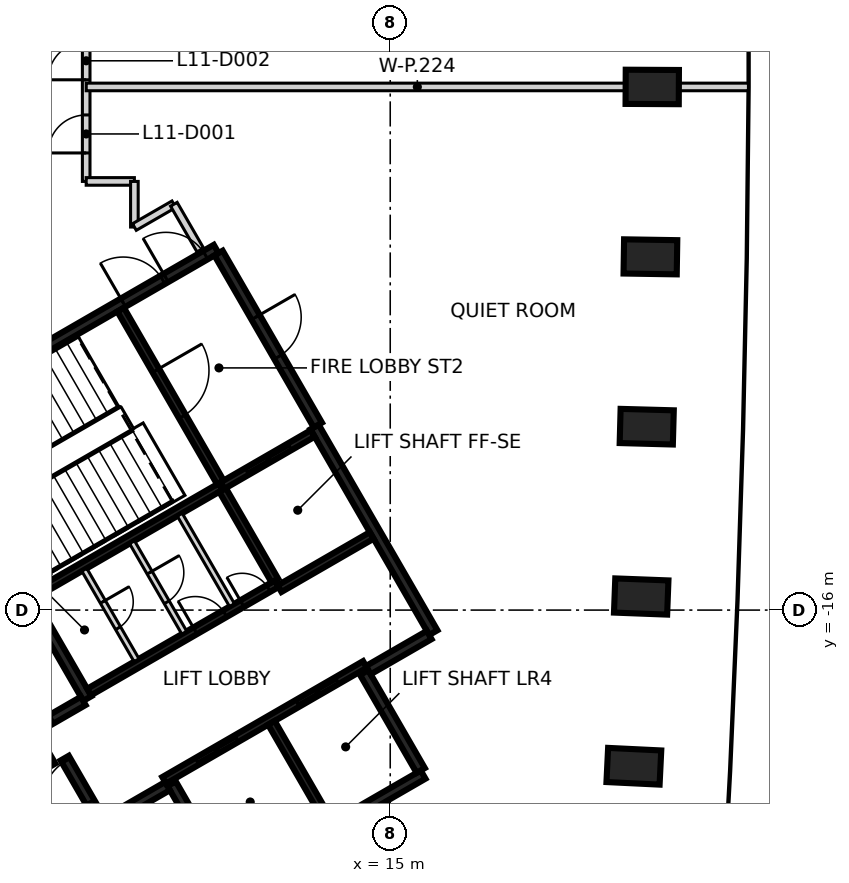
"""IFC4 building model, lengths in metres.
Left out: names, types, materials, properties, quantities, classifications, styles, units other than length and angle.
Written with IfcOpenShell. Run it as: python <this file> out.ifc"""

import sys

from ifc_helpers import new_model, si_unit, direction, frame, frame_2d, origin, origin_2d, place, context, subcontext, project, spatial, rectangle, extrude, element, fill, save


model = new_model("IFC4")
c1 = context("Model", 3, precision=1e-05, world=origin(), true_north=direction((0.0, 1.0)))
c2 = subcontext(c1, "Body", "Model", "MODEL_VIEW")
j1 = project(units=[si_unit("LENGTHUNIT", "METRE"), si_unit("PLANEANGLEUNIT", "RADIAN")], contexts=[c1])
p1 = place(None, origin())
s1 = spatial("IfcSite", under=j1, at=p1, CompositionType="ELEMENT")
p2 = place(p1, origin())
s2 = spatial("IfcBuilding", under=s1, at=p2, CompositionType="ELEMENT")
p3 = place(p2, frame((0.0, 0.0, 53.0)))
s3 = spatial("IfcBuildingStorey", under=s2, at=p3, CompositionType="ELEMENT", Elevation=53.0)
for number, where, z_axis, x_axis in (
    (1, (21.41, -20.109, -0.475), (0.0, 0.0, 1.0), (-0.999, 0.048, 0.0)),
    (2, (21.604, -15.643, -0.475), (0.0, 0.0, 1.0), (-0.999, 0.038, 0.0)),
    (3, (21.749, -11.174, -0.475), (0.0, 0.0, 1.0), (-1.0, 0.027, 0.0)),
    (4, (21.846, -6.706, -0.475), (0.0, 0.0, 1.0), (-1.0, 0.016, 0.0)),
    (5, (21.894, -2.235, -0.475), (0.0, 0.0, 1.0), (-1.0, 0.005, 0.0)),
):
    element("IfcColumn", number, at=place(p3, frame(where, z_axis=z_axis, x_axis=x_axis)), inside=s3, PredefinedType="COLUMN", context=c2, shape_type="SweptSolid", body=[
        extrude(rectangle(XDim=1.4, YDim=0.9, at=origin_2d()), origin(), (0.0, 0.0, 1.0), 3.6),
    ])
p4 = place(p3, frame((0.417, -12.273, 0.0), z_axis=(0.0, 0.0, 1.0), x_axis=(0.866021906294, 0.500006057782, 0.0)))
e6 = element("IfcWall", 6, at=p4, inside=s3, PredefinedType="SHEAR", context=c2, shape_type="SweptSolid", body=[
    extrude(rectangle(XDim=11.55, YDim=0.25, at=frame_2d((5.775, 0.0))), origin(), (0.0, 0.0, 1.0), 3.125),
])
p5 = place(p4, frame((10.025, 0.0, 0.0)))
e7 = element("IfcOpeningElement", 7, at=p5, cuts=e6, PredefinedType="OPENING", context=c2, shape_type="SweptSolid", body=[
    extrude(rectangle(XDim=1.2, YDim=2.1, at=frame_2d((0.6, 1.05))), frame((0.0, 0.135, 0.0), z_axis=(0.0, -1.0, 0.0), x_axis=(1.0, 0.0, 0.0)), (0.0, 0.0, 1.0), 0.27),
])
p6 = place(p4, frame((8.725, 0.0, 0.0)))
e8 = element("IfcOpeningElement", 8, at=p6, cuts=e6, PredefinedType="OPENING", context=c2, shape_type="SweptSolid", body=[
    extrude(rectangle(XDim=1.2, YDim=2.1, at=frame_2d((0.6, 1.05))), frame((0.0, 0.135, 0.0), z_axis=(0.0, -1.0, 0.0), x_axis=(1.0, 0.0, 0.0)), (0.0, 0.0, 1.0), 0.27),
])
p7 = place(p3, frame((13.008, -11.181, 0.0), z_axis=(0.0, 0.0, 1.0), x_axis=(0.500004234368, -0.866022959057, 0.0)))
e9 = element("IfcWall", 9, at=p7, inside=s3, PredefinedType="SHEAR", context=c2, shape_type="SweptSolid", body=[
    extrude(rectangle(XDim=6.25, YDim=0.25, at=frame_2d((3.125, 0.0))), origin(), (0.0, 0.0, 1.0), 3.125),
])
p8 = place(p3, frame((15.865, -20.328, 0.0), z_axis=(0.0, 0.0, 1.0), x_axis=(-0.86602852612, -0.499994591916, 0.0)))
e10 = element("IfcWall", 10, at=p8, inside=s3, PredefinedType="SHEAR", context=c2, shape_type="SweptSolid", body=[
    extrude(rectangle(XDim=5.85, YDim=0.25, at=frame_2d((2.925, 0.0))), origin(), (0.0, 0.0, 1.0), 3.125),
])
p9 = place(p3, frame((10.483, -6.606, 0.0), z_axis=(0.0, 0.0, 1.0), x_axis=(0.49999885962, -0.866026062182, 0.0)))
e11 = element("IfcWall", 11, at=p9, inside=s3, PredefinedType="SHEAR", context=c2, shape_type="SweptSolid", body=[
    extrude(rectangle(XDim=5.225, YDim=0.25, at=frame_2d((2.612, 0.0))), origin(), (0.0, 0.0, 1.0), 3.125),
])
p10 = place(p9, frame((1.95, 0.0, 0.0)))
e12 = element("IfcOpeningElement", 12, at=p10, cuts=e11, PredefinedType="OPENING", context=c2, shape_type="SweptSolid", body=[
    extrude(rectangle(XDim=1.2, YDim=2.1, at=frame_2d((0.6, 1.05))), frame((0.0, 0.135, 0.0), z_axis=(0.0, -1.0, 0.0), x_axis=(1.0, 0.0, 0.0)), (0.0, 0.0, 1.0), 0.27),
])
p11 = place(p3, frame((7.031, -18.327, 0.0), z_axis=(0.0, 0.0, 1.0), x_axis=(-0.499971222258, 0.866042017984, 0.0)))
e13 = element("IfcWall", 13, at=p11, inside=s3, PredefinedType="SHEAR", context=c2, shape_type="SweptSolid", body=[
    extrude(rectangle(XDim=3.2, YDim=0.25, at=frame_2d((1.6, 0.0))), origin(), (0.0, 0.0, 1.0), 3.125),
])
for number, where, z_axis, x_axis in (
    (14, (14.315, -17.644, 0.0), (0.0, 0.0, 1.0), (0.5, -0.866, 0.0)),
    (15, (10.736, -23.145, 0.0), (0.0, 0.0, 1.0), (-0.5, 0.866, 0.0)),
):
    element("IfcWall", number, at=place(p3, frame(where, z_axis=z_axis, x_axis=x_axis)), inside=s3, PredefinedType="SHEAR", context=c2, shape_type="SweptSolid", body=[
        extrude(rectangle(XDim=2.974, YDim=0.25, at=frame_2d((1.487, 0.0))), origin(), (0.0, 0.0, 1.0), 3.125),
    ])
p12 = place(p3, frame((9.14, -20.631, 0.0), z_axis=(0.0, 0.0, 1.0), x_axis=(-0.866043531843, -0.499968599967, 0.0)))
e16 = element("IfcWall", 16, at=p12, inside=s3, PredefinedType="SHEAR", context=c2, shape_type="SweptSolid", body=[
    extrude(rectangle(XDim=1.975, YDim=0.25, at=frame_2d((0.987, 0.0))), origin(), (0.0, 0.0, 1.0), 3.125),
])
p13 = place(p3, frame((16.025, -16.656, 0.0), z_axis=(0.0, 0.0, 1.0), x_axis=(-0.866016279763, -0.500015802937, 0.0)))
e17 = element("IfcWall", 17, at=p13, inside=s3, PredefinedType="SHEAR", context=c2, shape_type="SweptSolid", body=[
    extrude(rectangle(XDim=1.849, YDim=0.25, at=frame_2d((0.925, 0.0))), origin(), (0.0, 0.0, 1.0), 3.125),
])
p14 = place(p3, frame((7.367, -21.51, 0.0), z_axis=(0.0, 0.0, 1.0), x_axis=(-0.499983108224, 0.866035156036, 0.0)))
e18 = element("IfcWall", 18, at=p14, inside=s3, PredefinedType="SHEAR", context=c2, shape_type="SweptSolid", body=[
    extrude(rectangle(XDim=1.865, YDim=0.25, at=frame_2d((0.932, 0.0))), origin(), (0.0, 0.0, 1.0), 3.125),
])
p15 = place(p14, frame((0.535, 0.0, 0.0)))
e19 = element("IfcOpeningElement", 19, at=p15, cuts=e18, PredefinedType="OPENING", context=c2, shape_type="SweptSolid", body=[
    extrude(rectangle(XDim=1.25, YDim=2.1, at=frame_2d((0.625, 1.05))), frame((0.0, 0.135, 0.0), z_axis=(0.0, -1.0, 0.0), x_axis=(1.0, 0.0, 0.0)), (0.0, 0.0, 1.0), 0.27),
])
p16 = place(p3, frame((6.065, -18.885, 0.0), z_axis=(0.0, 0.0, 1.0), x_axis=(0.866017078145, 0.500014420154, 0.0)))
e20 = element("IfcWall", 20, at=p16, inside=s3, PredefinedType="SHEAR", context=c2, shape_type="SweptSolid", body=[
    extrude(rectangle(XDim=0.989, YDim=0.25, at=frame_2d((0.495, 0.0))), origin(), (0.0, 0.0, 1.0), 3.125),
])
p17 = place(p3, frame((6.08, -20.1, 0.0), z_axis=(0.0, 0.0, 1.0), x_axis=(-0.500051773299, 0.865995510393, 0.0)))
e21 = element("IfcWall", 21, at=p17, inside=s3, PredefinedType="SHEAR", context=c2, shape_type="SweptSolid", body=[
    extrude(rectangle(XDim=0.685, YDim=0.25, at=frame_2d((0.342, 0.0))), origin(), (0.0, 0.0, 1.0), 3.125),
])
p18 = place(p3, frame((9.052, -20.48, 0.0), z_axis=(0.0, 0.0, 1.0), x_axis=(0.866030299012, 0.499991521122, 0.0)))
e22 = element("IfcWall", 22, at=p18, inside=s3, PredefinedType="SHEAR", context=c2, shape_type="SweptSolid", body=[
    extrude(rectangle(XDim=6.1, YDim=0.2, at=frame_2d((3.05, 0.0))), origin(), (0.0, 0.0, 1.0), 3.125),
])
p19 = place(p18, frame((1.0, 0.0, 0.0)))
e23 = element("IfcOpeningElement", 23, at=p19, cuts=e22, PredefinedType="OPENING", context=c2, shape_type="SweptSolid", body=[
    extrude(rectangle(XDim=1.2, YDim=2.1, at=frame_2d((0.6, 1.05))), frame((0.0, 0.11, 0.0), z_axis=(0.0, -1.0, 0.0), x_axis=(1.0, 0.0, 0.0)), (0.0, 0.0, 1.0), 0.22),
])
p20 = place(p18, frame((4.05, 0.0, 0.0)))
e24 = element("IfcOpeningElement", 24, at=p20, cuts=e22, PredefinedType="OPENING", context=c2, shape_type="SweptSolid", body=[
    extrude(rectangle(XDim=1.2, YDim=2.1, at=frame_2d((0.6, 1.05))), frame((0.0, 0.11, 0.0), z_axis=(0.0, -1.0, 0.0), x_axis=(1.0, 0.0, 0.0)), (0.0, 0.0, 1.0), 0.22),
])
p21 = place(p3, frame((10.538, -12.752, 0.0), z_axis=(0.0, 0.0, 1.0), x_axis=(-0.866038630372, -0.499977090179, 0.0)))
e25 = element("IfcWall", 25, at=p21, inside=s3, PredefinedType="SHEAR", context=c2, shape_type="SweptSolid", body=[
    extrude(rectangle(XDim=5.699, YDim=0.2, at=frame_2d((2.85, 0.0))), origin(), (0.0, 0.0, 1.0), 3.125),
])
p22 = place(p3, frame((7.077, -18.156, 0.0), z_axis=(0.0, 0.0, 1.0), x_axis=(0.866038630372, 0.499977090179, 0.0)))
e26 = element("IfcWall", 26, at=p22, inside=s3, PredefinedType="SHEAR", context=c2, shape_type="SweptSolid", body=[
    extrude(rectangle(XDim=5.699, YDim=0.2, at=frame_2d((2.85, 0.0))), origin(), (0.0, 0.0, 1.0), 3.125),
])
p23 = place(p22, frame((3.224, 0.0, 0.0)))
e27 = element("IfcOpeningElement", 27, at=p23, cuts=e26, PredefinedType="OPENING", context=c2, shape_type="SweptSolid", body=[
    extrude(rectangle(XDim=0.9, YDim=2.1, at=frame_2d((0.45, 1.05))), frame((0.0, 0.11, 0.0), z_axis=(0.0, -1.0, 0.0), x_axis=(1.0, 0.0, 0.0)), (0.0, 0.0, 1.0), 0.22),
])
p24 = place(p22, frame((4.649, 0.0, 0.0)))
e28 = element("IfcOpeningElement", 28, at=p24, cuts=e26, PredefinedType="OPENING", context=c2, shape_type="SweptSolid", body=[
    extrude(rectangle(XDim=0.8, YDim=2.1, at=frame_2d((0.4, 1.05))), frame((0.0, 0.11, 0.0), z_axis=(0.0, -1.0, 0.0), x_axis=(1.0, 0.0, 0.0)), (0.0, 0.0, 1.0), 0.22),
])
p25 = place(p3, frame((7.906, -8.094, 0.0), z_axis=(0.0, 0.0, 1.0), x_axis=(0.500024287448, -0.866011380966, 0.0)))
e29 = element("IfcWall", 29, at=p25, inside=s3, PredefinedType="SHEAR", context=c2, shape_type="SweptSolid", body=[
    extrude(rectangle(XDim=5.251, YDim=0.2, at=frame_2d((2.625, 0.0))), origin(), (0.0, 0.0, 1.0), 3.125),
])
p26 = place(p25, frame((1.849, 0.0, 0.0)))
e30 = element("IfcOpeningElement", 30, at=p26, cuts=e29, PredefinedType="OPENING", context=c2, shape_type="SweptSolid", body=[
    extrude(rectangle(XDim=1.4, YDim=2.1, at=frame_2d((0.7, 1.05))), frame((0.0, 0.11, 0.0), z_axis=(0.0, -1.0, 0.0), x_axis=(1.0, 0.0, 0.0)), (0.0, 0.0, 1.0), 0.22),
])
p27 = place(p3, frame((11.875, -18.967, 0.0), z_axis=(0.0, 0.0, 1.0), x_axis=(0.49998131003, -0.866036194175, 0.0)))
e31 = element("IfcWall", 31, at=p27, inside=s3, PredefinedType="SHEAR", context=c2, shape_type="SweptSolid", body=[
    extrude(rectangle(XDim=3.048, YDim=0.2, at=frame_2d((1.524, 0.0))), origin(), (0.0, 0.0, 1.0), 3.125),
])
p28 = place(p3, frame((11.963, -15.22, 0.0), z_axis=(0.0, 0.0, 1.0), x_axis=(-0.500034990121, 0.866005201286, 0.0)))
e32 = element("IfcWall", 32, at=p28, inside=s3, PredefinedType="SHEAR", context=c2, shape_type="SweptSolid", body=[
    extrude(rectangle(XDim=2.75, YDim=0.2, at=frame_2d((1.375, 0.0))), origin(), (0.0, 0.0, 1.0), 3.125),
])
p29 = place(p3, frame((10.587, -12.723, 0.0), z_axis=(0.0, 0.0, 1.0), x_axis=(0.866037306777, 0.499979382845, 0.0)))
e33 = element("IfcWall", 33, at=p29, inside=s3, PredefinedType="SHEAR", context=c2, shape_type="SweptSolid", body=[
    extrude(rectangle(XDim=2.742, YDim=0.2, at=frame_2d((1.371, 0.0))), origin(), (0.0, 0.0, 1.0), 3.125),
])
p30 = place(p29, frame((0.743, 0.0, 0.0)))
e34 = element("IfcOpeningElement", 34, at=p30, cuts=e33, PredefinedType="OPENING", context=c2, shape_type="SweptSolid", body=[
    extrude(rectangle(XDim=1.3, YDim=2.1, at=frame_2d((0.65, 1.05))), frame((0.0, 0.11, 0.0), z_axis=(0.0, -1.0, 0.0), x_axis=(1.0, 0.0, 0.0)), (0.0, 0.0, 1.0), 0.22),
])
p31 = place(p3, frame((14.512, -14.037, 0.0), z_axis=(0.0, 0.0, 1.0), x_axis=(-0.866044696403, -0.499966582715, 0.0)))
e35 = element("IfcWall", 35, at=p31, inside=s3, PredefinedType="SHEAR", context=c2, shape_type="SweptSolid", body=[
    extrude(rectangle(XDim=2.799, YDim=0.2, at=frame_2d((1.399, 0.0))), origin(), (0.0, 0.0, 1.0), 3.125),
])
p32 = place(p3, frame((8.207, -14.214, 0.0), z_axis=(0.0, 0.0, 1.0), x_axis=(0.50002746344, -0.86600954718, 0.0)))
e36 = element("IfcWall", 36, at=p32, inside=s3, PredefinedType="PARTITIONING", context=c2, shape_type="SweptSolid", body=[
    extrude(rectangle(XDim=2.748, YDim=0.15, at=frame_2d((1.374, 0.0))), origin(), (0.0, 0.0, 1.0), 3.125),
])
p33 = place(p32, frame((0.924, 0.0, 0.0)))
e37 = element("IfcOpeningElement", 37, at=p33, cuts=e36, PredefinedType="OPENING", context=c2, shape_type="SweptSolid", body=[
    extrude(rectangle(XDim=0.9, YDim=2.1, at=frame_2d((0.45, 1.05))), frame((0.0, 0.085, 0.0), z_axis=(0.0, -1.0, 0.0), x_axis=(1.0, 0.0, 0.0)), (0.0, 0.0, 1.0), 0.17),
])
p34 = place(p3, frame((9.462, -13.489, 0.0), z_axis=(0.0, 0.0, 1.0), x_axis=(0.499988999718, -0.866031754707, 0.0)))
e38 = element("IfcWall", 38, at=p34, inside=s3, PredefinedType="PARTITIONING", context=c2, shape_type="SweptSolid", body=[
    extrude(rectangle(XDim=2.749, YDim=0.15, at=frame_2d((1.374, 0.0))), origin(), (0.0, 0.0, 1.0), 3.125),
])
p35 = place(p3, frame((6.951, -14.939, 0.0), z_axis=(0.0, 0.0, 1.0), x_axis=(0.499988999718, -0.866031754707, 0.0)))
e39 = element("IfcWall", 39, at=p35, inside=s3, PredefinedType="PARTITIONING", context=c2, shape_type="SweptSolid", body=[
    extrude(rectangle(XDim=2.749, YDim=0.15, at=frame_2d((1.374, 0.0))), origin(), (0.0, 0.0, 1.0), 3.125),
])
p36 = place(p35, frame((0.974, 0.0, 0.0)))
e40 = element("IfcOpeningElement", 40, at=p36, cuts=e39, PredefinedType="OPENING", context=c2, shape_type="SweptSolid", body=[
    extrude(rectangle(XDim=0.8, YDim=2.1, at=frame_2d((0.4, 1.05))), frame((0.0, 0.085, 0.0), z_axis=(0.0, -1.0, 0.0), x_axis=(1.0, 0.0, 0.0)), (0.0, 0.0, 1.0), 0.17),
])
p37 = place(p3, frame((7.0, -4.721, 0.0), z_axis=(0.0, 0.0, 1.0), x_axis=(0.0, 1.0, 0.0)))
e41 = element("IfcWall", 41, at=p37, inside=s3, PredefinedType="PARTITIONING", context=c2, shape_type="SweptSolid", body=[
    extrude(rectangle(XDim=8.799, YDim=0.2, at=frame_2d((4.399, 0.0))), origin(), (0.0, 0.0, 1.0), 3.125),
])
p38 = place(p37, frame((0.749, 0.0, 0.0)))
e42 = element("IfcOpeningElement", 42, at=p38, cuts=e41, PredefinedType="OPENING", context=c2, shape_type="SweptSolid", body=[
    extrude(rectangle(XDim=1.0, YDim=2.1, at=frame_2d((0.5, 1.05))), frame((0.0, 0.11, 0.0), z_axis=(0.0, -1.0, 0.0), x_axis=(1.0, 0.0, 0.0)), (0.0, 0.0, 1.0), 0.22),
])
p39 = place(p37, frame((2.674, 0.0, 0.0)))
e43 = element("IfcOpeningElement", 43, at=p39, cuts=e41, PredefinedType="OPENING", context=c2, shape_type="SweptSolid", body=[
    extrude(rectangle(XDim=1.0, YDim=2.1, at=frame_2d((0.5, 1.05))), frame((0.0, 0.11, 0.0), z_axis=(0.0, -1.0, 0.0), x_axis=(1.0, 0.0, 0.0)), (0.0, 0.0, 1.0), 0.22),
])
p40 = place(p3, frame((7.0, -4.721, 0.0), z_axis=(0.0, 0.0, 1.0), x_axis=(1.0, 0.0, 0.0)))
e44 = element("IfcWall", 44, at=p40, inside=s3, PredefinedType="PARTITIONING", context=c2, shape_type="SweptSolid", body=[
    extrude(rectangle(XDim=1.268, YDim=0.2, at=frame_2d((0.634, 0.0))), origin(), (0.0, 0.0, 1.0), 3.125),
])
p41 = place(p3, frame((8.268, -5.921, 0.0), z_axis=(0.0, 0.0, 1.0), x_axis=(0.0, 1.0, 0.0)))
e45 = element("IfcWall", 45, at=p41, inside=s3, PredefinedType="PARTITIONING", context=c2, shape_type="SweptSolid", body=[
    extrude(rectangle(XDim=1.2, YDim=0.2, at=frame_2d((0.6, 0.0))), origin(), (0.0, 0.0, 1.0), 3.125),
])
p42 = place(p3, frame((8.268, -5.921, 0.0), z_axis=(0.0, 0.0, 1.0), x_axis=(0.866344856625, 0.499446282797, 0.0)))
e46 = element("IfcWall", 46, at=p42, inside=s3, PredefinedType="PARTITIONING", context=c2, shape_type="SweptSolid", body=[
    extrude(rectangle(XDim=1.199, YDim=0.2, at=frame_2d((0.6, 0.0))), origin(), (0.0, 0.0, 1.0), 3.125),
])
p43 = place(p3, frame((9.307, -5.322, 0.0), z_axis=(0.0, 0.0, 1.0), x_axis=(0.500295157811, -0.865854927266, 0.0)))
e47 = element("IfcWall", 47, at=p43, inside=s3, PredefinedType="PARTITIONING", context=c2, shape_type="SweptSolid", body=[
    extrude(rectangle(XDim=1.39, YDim=0.2, at=frame_2d((0.695, 0.0))), origin(), (0.0, 0.0, 1.0), 3.125),
])
p44 = place(p3, frame((7.001, -2.235, 0.0), z_axis=(0.0, 0.0, 1.0), x_axis=(1.0, 0.0, 0.0)))
e48 = element("IfcWall", 48, at=p44, inside=s3, PredefinedType="PARTITIONING", context=c2, shape_type="SweptSolid", body=[
    extrude(rectangle(XDim=17.424, YDim=0.2, at=frame_2d((8.712, 0.0))), origin(), (0.0, 0.0, 1.0), 3.125),
])
p45 = place(p30, origin())
e49 = element("IfcDoor", 49, at=p45, inside=s3, OperationType="SLIDING_TO_RIGHT", PredefinedType="DOOR", context=c2, shape_type="SweptSolid", body=[
    extrude(rectangle(XDim=1.3, YDim=2.1, at=frame_2d((0.65, 1.05))), frame((0.0, 0.025, 0.0), z_axis=(0.0, -1.0, 0.0), x_axis=(1.0, 0.0, 0.0)), (0.0, 0.0, 1.0), 0.05),
])
fill(e34, e49)
p46 = place(p19, origin())
e50 = element("IfcDoor", 50, at=p46, inside=s3, OperationType="DOUBLE_DOOR_SLIDING", PredefinedType="DOOR", context=c2, shape_type="SweptSolid", body=[
    extrude(rectangle(XDim=1.2, YDim=2.1, at=frame_2d((0.6, 1.05))), frame((0.0, 0.025, 0.0), z_axis=(0.0, -1.0, 0.0), x_axis=(1.0, 0.0, 0.0)), (0.0, 0.0, 1.0), 0.05),
])
fill(e23, e50)
p47 = place(p20, origin())
e51 = element("IfcDoor", 51, at=p47, inside=s3, OperationType="DOUBLE_DOOR_SLIDING", PredefinedType="DOOR", context=c2, shape_type="SweptSolid", body=[
    extrude(rectangle(XDim=1.2, YDim=2.1, at=frame_2d((0.6, 1.05))), frame((0.0, 0.025, 0.0), z_axis=(0.0, -1.0, 0.0), x_axis=(1.0, 0.0, 0.0)), (0.0, 0.0, 1.0), 0.05),
])
fill(e24, e51)
p48 = place(p15, origin())
e52 = element("IfcDoor", 52, at=p48, inside=s3, OperationType="SINGLE_SWING_LEFT", PredefinedType="DOOR", context=c2, shape_type="SweptSolid", body=[
    extrude(rectangle(XDim=1.25, YDim=2.1, at=frame_2d((0.625, 1.05))), frame((0.0, 0.025, 0.0), z_axis=(0.0, -1.0, 0.0), x_axis=(1.0, 0.0, 0.0)), (0.0, 0.0, 1.0), 0.05),
])
fill(e19, e52)
p49 = place(p5, origin())
e53 = element("IfcDoor", 53, at=p49, inside=s3, OperationType="SINGLE_SWING_LEFT", PredefinedType="DOOR", context=c2, shape_type="SweptSolid", body=[
    extrude(rectangle(XDim=1.2, YDim=2.1, at=frame_2d((0.6, 1.05))), frame((0.0, 0.025, 0.0), z_axis=(0.0, -1.0, 0.0), x_axis=(1.0, 0.0, 0.0)), (0.0, 0.0, 1.0), 0.05),
])
fill(e7, e53)
p50 = place(p6, origin())
e54 = element("IfcDoor", 54, at=p50, inside=s3, OperationType="SINGLE_SWING_RIGHT", PredefinedType="DOOR", context=c2, shape_type="SweptSolid", body=[
    extrude(rectangle(XDim=1.2, YDim=2.1, at=frame_2d((0.6, 1.05))), frame((0.0, 0.025, 0.0), z_axis=(0.0, -1.0, 0.0), x_axis=(1.0, 0.0, 0.0)), (0.0, 0.0, 1.0), 0.05),
])
fill(e8, e54)
p51 = place(p26, origin())
e55 = element("IfcDoor", 55, at=p51, inside=s3, OperationType="SINGLE_SWING_RIGHT", PredefinedType="DOOR", context=c2, shape_type="SweptSolid", body=[
    extrude(rectangle(XDim=1.4, YDim=2.1, at=frame_2d((0.7, 1.05))), frame((0.0, 0.025, 0.0), z_axis=(0.0, -1.0, 0.0), x_axis=(1.0, 0.0, 0.0)), (0.0, 0.0, 1.0), 0.05),
])
fill(e30, e55)
p52 = place(p23, origin())
e56 = element("IfcDoor", 56, at=p52, inside=s3, OperationType="SINGLE_SWING_LEFT", PredefinedType="DOOR", context=c2, shape_type="SweptSolid", body=[
    extrude(rectangle(XDim=0.9, YDim=2.1, at=frame_2d((0.45, 1.05))), frame((0.0, 0.025, 0.0), z_axis=(0.0, -1.0, 0.0), x_axis=(1.0, 0.0, 0.0)), (0.0, 0.0, 1.0), 0.05),
])
fill(e27, e56)
p53 = place(p24, origin())
e57 = element("IfcDoor", 57, at=p53, inside=s3, OperationType="SINGLE_SWING_RIGHT", PredefinedType="DOOR", context=c2, shape_type="SweptSolid", body=[
    extrude(rectangle(XDim=0.8, YDim=2.1, at=frame_2d((0.4, 1.05))), frame((0.0, 0.025, 0.0), z_axis=(0.0, -1.0, 0.0), x_axis=(1.0, 0.0, 0.0)), (0.0, 0.0, 1.0), 0.05),
])
fill(e28, e57)
p54 = place(p33, origin())
e58 = element("IfcDoor", 58, at=p54, inside=s3, OperationType="SINGLE_SWING_RIGHT", PredefinedType="DOOR", context=c2, shape_type="SweptSolid", body=[
    extrude(rectangle(XDim=0.9, YDim=2.1, at=frame_2d((0.45, 1.05))), frame((0.0, 0.025, 0.0), z_axis=(0.0, -1.0, 0.0), x_axis=(1.0, 0.0, 0.0)), (0.0, 0.0, 1.0), 0.05),
])
fill(e37, e58)
p55 = place(p36, origin())
e59 = element("IfcDoor", 59, at=p55, inside=s3, OperationType="SINGLE_SWING_LEFT", PredefinedType="DOOR", context=c2, shape_type="SweptSolid", body=[
    extrude(rectangle(XDim=0.8, YDim=2.1, at=frame_2d((0.4, 1.05))), frame((0.0, 0.025, 0.0), z_axis=(0.0, -1.0, 0.0), x_axis=(1.0, 0.0, 0.0)), (0.0, 0.0, 1.0), 0.05),
])
fill(e40, e59)
p56 = place(p10, origin())
e60 = element("IfcDoor", 60, at=p56, inside=s3, OperationType="SINGLE_SWING_LEFT", PredefinedType="DOOR", context=c2, shape_type="SweptSolid", body=[
    extrude(rectangle(XDim=1.2, YDim=2.1, at=frame_2d((0.6, 1.05))), frame((0.0, 0.025, 0.0), z_axis=(0.0, -1.0, 0.0), x_axis=(1.0, 0.0, 0.0)), (0.0, 0.0, 1.0), 0.05),
])
fill(e12, e60)
p57 = place(p38, frame((1.0, 0.0, 0.0), z_axis=(0.0, 0.0, 1.0), x_axis=(-1.0, 0.0, 0.0)))
e61 = element("IfcDoor", 61, at=p57, inside=s3, OperationType="SINGLE_SWING_LEFT", PredefinedType="DOOR", context=c2, shape_type="SweptSolid", body=[
    extrude(rectangle(XDim=1.0, YDim=2.1, at=frame_2d((0.5, 1.05))), frame((0.0, 0.025, 0.0), z_axis=(0.0, -1.0, 0.0), x_axis=(1.0, 0.0, 0.0)), (0.0, 0.0, 1.0), 0.05),
])
fill(e42, e61)
p58 = place(p39, frame((1.0, 0.0, 0.0), z_axis=(0.0, 0.0, 1.0), x_axis=(-1.0, 0.0, 0.0)))
e62 = element("IfcDoor", 62, at=p58, inside=s3, OperationType="SINGLE_SWING_LEFT", PredefinedType="DOOR", context=c2, shape_type="SweptSolid", body=[
    extrude(rectangle(XDim=1.0, YDim=2.1, at=frame_2d((0.5, 1.05))), frame((0.0, 0.025, 0.0), z_axis=(0.0, -1.0, 0.0), x_axis=(1.0, 0.0, 0.0)), (0.0, 0.0, 1.0), 0.05),
])
fill(e43, e62)
save(model, sys.argv[1])
